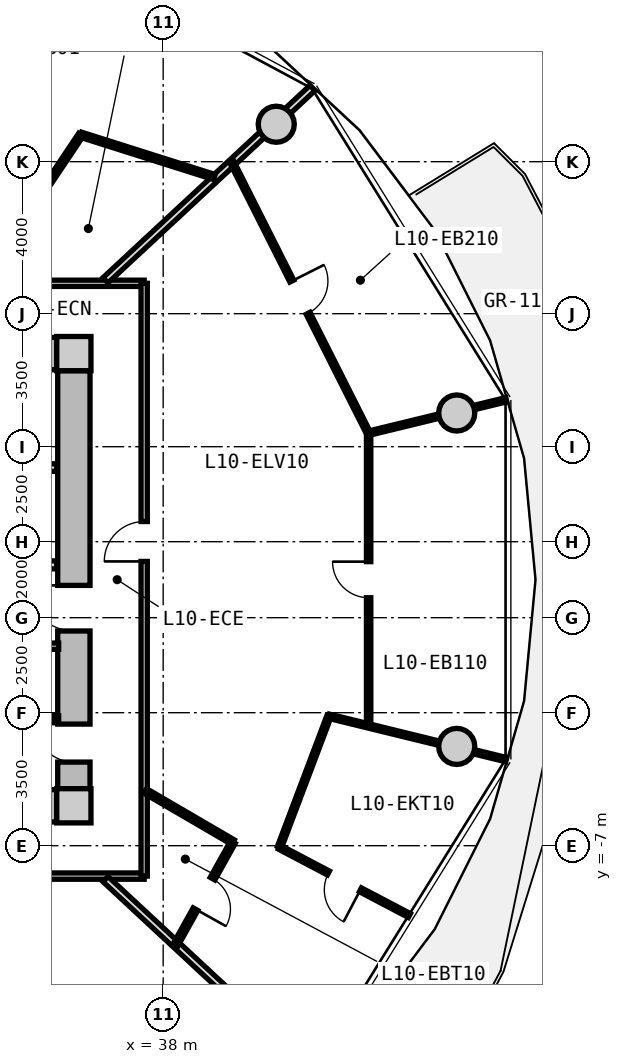
"""IFC4 building model, lengths in metres.
Left out: names, types, materials, properties, quantities, classifications, styles, units other than length and angle.
Written with IfcOpenShell. Run it as: python <this file> out.ifc"""

import sys

from ifc_helpers import new_model, si_unit, direction, frame, frame_2d, origin, origin_2d, place, context, subcontext, project, spatial, rectangle, circle, extrude, source, transform, mapped, element, fill, save


model = new_model("IFC4")
c1 = context("Model", 3, precision=1e-05, world=origin(), true_north=direction((0.0, 1.0)))
c2 = subcontext(c1, "Body", "Model", "MODEL_VIEW")
j1 = project(units=[si_unit("LENGTHUNIT", "METRE"), si_unit("PLANEANGLEUNIT", "RADIAN")], contexts=[c1])
p1 = place(None, origin())
s1 = spatial("IfcSite", under=j1, at=p1, CompositionType="ELEMENT")
p2 = place(p1, origin())
s2 = spatial("IfcBuilding", under=s1, at=p2, CompositionType="ELEMENT")
p3 = place(p2, frame((0.0, 0.0, 36.85)))
s3 = spatial("IfcBuildingStorey", under=s2, at=p3, CompositionType="ELEMENT", Elevation=36.85)
m1 = source(origin(), c2, "Body", "SweptSolid", [
    extrude(rectangle(XDim=0.9, YDim=0.9, at=origin_2d()), origin(), (0.0, 0.0, 1.0), 3.05),
])
for number, where, z_axis, x_axis in (
    (1, (35.65, -5.95, 0.0), (0.0, 0.0, 1.0), (1.0, 0.0, 0.0)),
    (2, (35.65, 5.95, 0.0), (0.0, 0.0, 1.0), (1.0, 0.0, 0.0)),
):
    element("IfcColumn", number, at=place(p3, frame(where, z_axis=z_axis, x_axis=x_axis)), inside=s3, PredefinedType="COLUMN", context=c2, shape_type="MappedRepresentation", body=[
        mapped(m1, transform((0.0, 0.0, 0.0), x_axis=(1.0, 0.0, 0.0), y_axis=(0.0, 1.0, 0.0), z_axis=(0.0, 0.0, 1.0), scale=1.0)),
    ])
m2 = source(origin(), c2, "Body", "SweptSolid", [
    extrude(rectangle(XDim=14.4, YDim=0.85, at=frame_2d((7.2, 0.0))), origin(), (0.0, 0.0, 1.0), 2.79),
])
for number, where, z_axis, x_axis in (
    (3, (20.8, 5.95, 0.0), (0.0, 0.0, 1.0), (1.0, 0.0, 0.0)),
    (4, (35.2, -5.95, 0.0), (0.0, 0.0, 1.0), (-1.0, 0.0, 0.0)),
):
    element("IfcWall", number, at=place(p3, frame(where, z_axis=z_axis, x_axis=x_axis)), inside=s3, PredefinedType="SHEAR", context=c2, shape_type="MappedRepresentation", body=[
        mapped(m2, transform((0.0, 0.0, 0.0), x_axis=(1.0, 0.0, 0.0), y_axis=(0.0, 1.0, 0.0), z_axis=(0.0, 0.0, 1.0), scale=1.0)),
    ])
m3 = source(origin(), c2, "Body", "SweptSolid", [
    extrude(rectangle(XDim=11.0, YDim=0.85, at=frame_2d((5.5, 0.0))), origin(), (0.0, 0.0, 1.0), 2.79),
])
p4 = place(p3, frame((35.65, 5.5, 0.0), z_axis=(0.0, 0.0, 1.0), x_axis=(0.0, -1.0, 0.0)))
e5 = element("IfcWall", 5, at=p4, inside=s3, PredefinedType="SHEAR", context=c2, shape_type="MappedRepresentation", body=[
    mapped(m3, transform((0.0, 0.0, 0.0), x_axis=(1.0, 0.0, 0.0), y_axis=(0.0, 1.0, 0.0), z_axis=(0.0, 0.0, 1.0), scale=1.0)),
])
p5 = place(p4, frame((5.65, 0.0, 0.0)))
e6 = element("IfcOpeningElement", 6, at=p5, cuts=e5, PredefinedType="OPENING", context=c2, shape_type="SweptSolid", body=[
    extrude(rectangle(XDim=1.2, YDim=2.15, at=frame_2d((0.6, 1.075))), frame((0.0, 0.435, 0.0), z_axis=(0.0, -1.0, 0.0), x_axis=(1.0, 0.0, 0.0)), (0.0, 0.0, 1.0), 0.87),
])
p6 = place(p4, frame((9.3, 0.0, 0.0)))
e7 = element("IfcOpeningElement", 7, at=p6, cuts=e5, PredefinedType="OPENING", context=c2, shape_type="SweptSolid", body=[
    extrude(rectangle(XDim=1.0, YDim=2.1, at=frame_2d((0.5, 1.05))), frame((0.0, 0.435, 0.0), z_axis=(0.0, -1.0, 0.0), x_axis=(1.0, 0.0, 0.0)), (0.0, 0.0, 1.0), 0.87),
])
m4 = source(origin(), c2, "Body", "SweptSolid", [
    extrude(circle(Radius=0.475, at=origin_2d()), origin(), (0.0, 0.0, 1.0), 3.05),
])
for number, where, z_axis, x_axis in (
    (8, (45.725, 4.387, 0.0), (0.0, 0.0, 1.0), (1.0, 0.0, 0.0)),
    (9, (40.975, 11.985, 0.0), (0.0, 0.0, 1.0), (1.0, 0.0, 0.0)),
    (10, (45.725, -4.387, 0.0), (0.0, 0.0, 1.0), (1.0, 0.0, 0.0)),
):
    element("IfcColumn", number, at=place(p3, frame(where, z_axis=z_axis, x_axis=x_axis)), inside=s3, PredefinedType="COLUMN", context=c2, shape_type="MappedRepresentation", body=[
        mapped(m4, transform((0.0, 0.0, 0.0), x_axis=(1.0, 0.0, 0.0), y_axis=(0.0, 1.0, 0.0), z_axis=(0.0, 0.0, 1.0), scale=1.0)),
    ])
m5 = source(origin(), c2, "Body", "SweptSolid", [
    extrude(rectangle(XDim=3.2, YDim=0.2, at=frame_2d((1.6, 0.0))), origin(), (0.0, 0.0, 1.0), 2.775),
])
p7 = place(p3, frame((32.0, 2.95, 0.0), z_axis=(0.0, 0.0, 1.0), x_axis=(1.0, 0.0, 0.0)))
e11 = element("IfcWall", 11, at=p7, inside=s3, PredefinedType="PARTITIONING", context=c2, shape_type="MappedRepresentation", body=[
    mapped(m5, transform((0.0, 0.0, 0.0), x_axis=(1.0, 0.0, 0.0), y_axis=(0.0, 1.0, 0.0), z_axis=(0.0, 0.0, 1.0), scale=1.0)),
])
m6 = source(origin(), c2, "Body", "SweptSolid", [
    extrude(rectangle(XDim=6.66, YDim=0.21, at=frame_2d((3.33, 0.0))), origin(), (0.0, 0.0, 1.0), 2.775),
])
p8 = place(p3, frame((28.54, 0.39, 0.0), z_axis=(0.0, 0.0, 1.0), x_axis=(1.0, 0.0, 0.0)))
e12 = element("IfcWall", 12, at=p8, inside=s3, PredefinedType="PARTITIONING", context=c2, shape_type="MappedRepresentation", body=[
    mapped(m6, transform((0.0, 0.0, 0.0), x_axis=(1.0, 0.0, 0.0), y_axis=(0.0, 1.0, 0.0), z_axis=(0.0, 0.0, 1.0), scale=1.0)),
])
p9 = place(p8, frame((1.0, 0.0, 0.0)))
e13 = element("IfcOpeningElement", 13, at=p9, cuts=e12, PredefinedType="OPENING", context=c2, shape_type="SweptSolid", body=[
    extrude(rectangle(XDim=1.2, YDim=2.15, at=frame_2d((0.6, 1.075))), frame((0.0, 0.115, 0.0), z_axis=(0.0, -1.0, 0.0), x_axis=(1.0, 0.0, 0.0)), (0.0, 0.0, 1.0), 0.23),
])
m7 = source(origin(), c2, "Body", "SweptSolid", [
    extrude(rectangle(XDim=2.7, YDim=0.165, at=frame_2d((1.35, 0.0))), origin(), (0.0, 0.0, 1.0), 2.775),
])
p10 = place(p3, frame((32.55, -1.75, 0.0), z_axis=(0.0, 0.0, 1.0), x_axis=(1.0, 0.0, 0.0)))
e14 = element("IfcWall", 14, at=p10, inside=s3, PredefinedType="PARTITIONING", context=c2, shape_type="MappedRepresentation", body=[
    mapped(m7, transform((0.0, 0.0, 0.0), x_axis=(1.0, 0.0, 0.0), y_axis=(0.0, 1.0, 0.0), z_axis=(0.0, 0.0, 1.0), scale=1.0)),
])
p11 = place(p10, frame((0.85, 0.0, 0.0)))
e15 = element("IfcOpeningElement", 15, at=p11, cuts=e14, PredefinedType="OPENING", context=c2, shape_type="SweptSolid", body=[
    extrude(rectangle(XDim=0.925, YDim=2.1, at=frame_2d((0.462, 1.05))), frame((0.0, 0.093, 0.0), z_axis=(0.0, -1.0, 0.0), x_axis=(1.0, 0.0, 0.0)), (0.0, 0.0, 1.0), 0.185),
])
m8 = source(origin(), c2, "Body", "SweptSolid", [
    extrude(rectangle(XDim=2.7, YDim=0.14, at=frame_2d((1.35, 0.0))), origin(), (0.0, 0.0, 1.0), 2.775),
])
p12 = place(p3, frame((32.55, -3.65, 0.0), z_axis=(0.0, 0.0, 1.0), x_axis=(1.0, 0.0, 0.0)))
e16 = element("IfcWall", 16, at=p12, inside=s3, PredefinedType="PARTITIONING", context=c2, shape_type="MappedRepresentation", body=[
    mapped(m8, transform((0.0, 0.0, 0.0), x_axis=(1.0, 0.0, 0.0), y_axis=(0.0, 1.0, 0.0), z_axis=(0.0, 0.0, 1.0), scale=1.0)),
])
m9 = source(origin(), c2, "Body", "SweptSolid", [
    extrude(rectangle(XDim=19.0, YDim=0.165, at=frame_2d((9.5, 0.0))), origin(), (0.0, 0.0, 1.0), 2.775),
])
p13 = place(p3, frame((18.5, 7.8, 0.0), z_axis=(0.0, 0.0, 1.0), x_axis=(1.0, 0.0, 0.0)))
e17 = element("IfcWall", 17, at=p13, inside=s3, PredefinedType="PARTITIONING", context=c2, shape_type="MappedRepresentation", body=[
    mapped(m9, transform((0.0, 0.0, 0.0), x_axis=(1.0, 0.0, 0.0), y_axis=(0.0, 1.0, 0.0), z_axis=(0.0, 0.0, 1.0), scale=1.0)),
])
p14 = place(p13, frame((10.523, 0.0, 0.0)))
e18 = element("IfcOpeningElement", 18, at=p14, cuts=e17, PredefinedType="OPENING", context=c2, shape_type="SweptSolid", body=[
    extrude(rectangle(XDim=0.92, YDim=2.1, at=frame_2d((0.46, 1.05))), frame((0.0, 0.093, 0.0), z_axis=(0.0, -1.0, 0.0), x_axis=(1.0, 0.0, 0.0)), (0.0, 0.0, 1.0), 0.185),
])
p15 = place(p13, frame((8.226, 0.0, 0.0)))
e19 = element("IfcOpeningElement", 19, at=p15, cuts=e17, PredefinedType="OPENING", context=c2, shape_type="SweptSolid", body=[
    extrude(rectangle(XDim=0.92, YDim=2.1, at=frame_2d((0.46, 1.05))), frame((0.0, 0.093, 0.0), z_axis=(0.0, -1.0, 0.0), x_axis=(1.0, 0.0, 0.0)), (0.0, 0.0, 1.0), 0.185),
])
p16 = place(p13, frame((3.506, 0.0, 0.0)))
e20 = element("IfcOpeningElement", 20, at=p16, cuts=e17, PredefinedType="OPENING", context=c2, shape_type="SweptSolid", body=[
    extrude(rectangle(XDim=1.25, YDim=2.2, at=frame_2d((0.625, 1.1))), frame((0.0, 0.093, 0.0), z_axis=(0.0, -1.0, 0.0), x_axis=(1.0, 0.0, 0.0)), (0.0, 0.0, 1.0), 0.185),
])
p17 = place(p13, frame((12.706, 0.0, 0.0)))
e21 = element("IfcOpeningElement", 21, at=p17, cuts=e17, PredefinedType="OPENING", context=c2, shape_type="SweptSolid", body=[
    extrude(rectangle(XDim=1.05, YDim=2.15, at=frame_2d((0.525, 1.075))), frame((0.0, 0.093, 0.0), z_axis=(0.0, -1.0, 0.0), x_axis=(1.0, 0.0, 0.0)), (0.0, 0.0, 1.0), 0.185),
])
p18 = place(p3, frame((37.5, -7.8, 0.0), z_axis=(0.0, 0.0, 1.0), x_axis=(-1.0, 0.0, 0.0)))
e22 = element("IfcWall", 22, at=p18, inside=s3, PredefinedType="PARTITIONING", context=c2, shape_type="MappedRepresentation", body=[
    mapped(m9, transform((0.0, 0.0, 0.0), x_axis=(1.0, 0.0, 0.0), y_axis=(0.0, 1.0, 0.0), z_axis=(0.0, 0.0, 1.0), scale=1.0)),
])
p19 = place(p18, frame((7.336, 0.0, 0.0)))
e23 = element("IfcOpeningElement", 23, at=p19, cuts=e22, PredefinedType="OPENING", context=c2, shape_type="SweptSolid", body=[
    extrude(rectangle(XDim=1.05, YDim=2.15, at=frame_2d((0.525, 1.075))), frame((0.0, 0.093, 0.0), z_axis=(0.0, -1.0, 0.0), x_axis=(1.0, 0.0, 0.0)), (0.0, 0.0, 1.0), 0.185),
])
m10 = source(origin(), c2, "Body", "SweptSolid", [
    extrude(rectangle(XDim=15.6, YDim=0.165, at=frame_2d((7.8, 0.0))), origin(), (0.0, 0.0, 1.0), 2.775),
])
p20 = place(p3, frame((37.5, 7.8, 0.0), z_axis=(0.0, 0.0, 1.0), x_axis=(0.0, -1.0, 0.0)))
e24 = element("IfcWall", 24, at=p20, inside=s3, PredefinedType="PARTITIONING", context=c2, shape_type="MappedRepresentation", body=[
    mapped(m10, transform((0.0, 0.0, 0.0), x_axis=(1.0, 0.0, 0.0), y_axis=(0.0, 1.0, 0.0), z_axis=(0.0, 0.0, 1.0), scale=1.0)),
])
p21 = place(p20, frame((6.269, 0.0, 0.0)))
e25 = element("IfcOpeningElement", 25, at=p21, cuts=e24, PredefinedType="OPENING", context=c2, shape_type="SweptSolid", body=[
    extrude(rectangle(XDim=1.05, YDim=2.15, at=frame_2d((0.525, 1.075))), frame((0.0, 0.093, 0.0), z_axis=(0.0, -1.0, 0.0), x_axis=(1.0, 0.0, 0.0)), (0.0, 0.0, 1.0), 0.185),
])
m11 = source(origin(), c2, "Body", "SweptSolid", [
    extrude(rectangle(XDim=7.435, YDim=0.19, at=frame_2d((3.717, 0.0))), origin(), (0.0, 0.0, 1.0), 2.225),
])
for number, where, z_axis, x_axis in (
    (26, (36.483, -7.88, 0.0), (0.0, 0.0, 1.0), (0.733, -0.681, 0.0)),
    (27, (36.483, 7.88, 0.0), (0.0, 0.0, 1.0), (0.733, 0.681, 0.0)),
):
    element("IfcWall", number, at=place(p3, frame(where, z_axis=z_axis, x_axis=x_axis)), inside=s3, PredefinedType="PARTITIONING", context=c2, shape_type="MappedRepresentation", body=[
        mapped(m11, transform((0.0, 0.0, 0.0), x_axis=(1.0, 0.0, 0.0), y_axis=(0.0, 1.0, 0.0), z_axis=(0.0, 0.0, 1.0), scale=1.0)),
    ])
m12 = source(origin(), c2, "Body", "SweptSolid", [
    extrude(rectangle(XDim=7.709, YDim=0.115, at=frame_2d((3.855, 0.0))), origin(), (0.0, 0.0, 1.0), 2.775),
])
p22 = place(p3, frame((43.406, -3.855, 0.0), z_axis=(0.0, 0.0, 1.0), x_axis=(0.0, 1.0, 0.0)))
e28 = element("IfcWall", 28, at=p22, inside=s3, PredefinedType="PARTITIONING", context=c2, shape_type="MappedRepresentation", body=[
    mapped(m12, transform((0.0, 0.0, 0.0), x_axis=(1.0, 0.0, 0.0), y_axis=(0.0, 1.0, 0.0), z_axis=(0.0, 0.0, 1.0), scale=1.0)),
])
p23 = place(p22, frame((3.38, 0.0, 0.0)))
e29 = element("IfcOpeningElement", 29, at=p23, cuts=e28, PredefinedType="OPENING", context=c2, shape_type="SweptSolid", body=[
    extrude(rectangle(XDim=0.95, YDim=2.1, at=frame_2d((0.475, 1.05))), frame((0.0, 0.067, 0.0), z_axis=(0.0, -1.0, 0.0), x_axis=(1.0, 0.0, 0.0)), (0.0, 0.0, 1.0), 0.135),
])
m13 = source(origin(), c2, "Body", "SweptSolid", [
    extrude(rectangle(XDim=4.803, YDim=0.115, at=frame_2d((2.401, 0.0))), origin(), (0.0, 0.0, 1.0), 2.225),
])
p24 = place(p3, frame((42.364, -3.594, 0.0), z_axis=(0.0, 0.0, 1.0), x_axis=(0.97129155908, -0.237892217736, 0.0)))
e30 = element("IfcWall", 30, at=p24, inside=s3, PredefinedType="PARTITIONING", context=c2, shape_type="MappedRepresentation", body=[
    mapped(m13, transform((0.0, 0.0, 0.0), x_axis=(1.0, 0.0, 0.0), y_axis=(0.0, 1.0, 0.0), z_axis=(0.0, 0.0, 1.0), scale=1.0)),
])
m14 = source(origin(), c2, "Body", "SweptSolid", [
    extrude(rectangle(XDim=8.018, YDim=0.115, at=frame_2d((4.009, 0.0))), origin(), (0.0, 0.0, 1.0), 2.775),
])
p25 = place(p3, frame((43.404, 3.854, 0.0), z_axis=(0.0, 0.0, 1.0), x_axis=(-0.450134355233, 0.89296084026, 0.0)))
e31 = element("IfcWall", 31, at=p25, inside=s3, PredefinedType="PARTITIONING", context=c2, shape_type="MappedRepresentation", body=[
    mapped(m14, transform((0.0, 0.0, 0.0), x_axis=(1.0, 0.0, 0.0), y_axis=(0.0, 1.0, 0.0), z_axis=(0.0, 0.0, 1.0), scale=1.0)),
])
p26 = place(p25, frame((3.534, 0.0, 0.0)))
e32 = element("IfcOpeningElement", 32, at=p26, cuts=e31, PredefinedType="OPENING", context=c2, shape_type="SweptSolid", body=[
    extrude(rectangle(XDim=0.95, YDim=2.1, at=frame_2d((0.475, 1.05))), frame((0.0, 0.067, 0.0), z_axis=(0.0, -1.0, 0.0), x_axis=(1.0, 0.0, 0.0)), (0.0, 0.0, 1.0), 0.135),
])
m15 = source(origin(), c2, "Body", "SweptSolid", [
    extrude(rectangle(XDim=3.73, YDim=0.115, at=frame_2d((1.865, 0.0))), origin(), (0.0, 0.0, 1.0), 2.225),
])
p27 = place(p3, frame((43.404, 3.854, 0.0), z_axis=(0.0, 0.0, 1.0), x_axis=(0.971644038568, 0.236448434791, 0.0)))
e33 = element("IfcWall", 33, at=p27, inside=s3, PredefinedType="PARTITIONING", context=c2, shape_type="MappedRepresentation", body=[
    mapped(m15, transform((0.0, 0.0, 0.0), x_axis=(1.0, 0.0, 0.0), y_axis=(0.0, 1.0, 0.0), z_axis=(0.0, 0.0, 1.0), scale=1.0)),
])
m16 = source(origin(), c2, "Body", "SweptSolid", [
    extrude(rectangle(XDim=2.669, YDim=0.14, at=frame_2d((1.335, 0.0))), origin(), (0.0, 0.0, 1.0), 2.775),
])
p28 = place(p3, frame((37.53, -5.561, 0.0), z_axis=(0.0, 0.0, 1.0), x_axis=(0.86369928178, -0.50400749067, 0.0)))
e34 = element("IfcWall", 34, at=p28, inside=s3, PredefinedType="PARTITIONING", context=c2, shape_type="MappedRepresentation", body=[
    mapped(m16, transform((0.0, 0.0, 0.0), x_axis=(1.0, 0.0, 0.0), y_axis=(0.0, 1.0, 0.0), z_axis=(0.0, 0.0, 1.0), scale=1.0)),
])
m17 = source(origin(), c2, "Body", "SweptSolid", [
    extrude(rectangle(XDim=3.121, YDim=0.14, at=frame_2d((1.561, 0.0))), origin(), (0.0, 0.0, 1.0), 2.775),
])
p29 = place(p3, frame((39.836, -6.906, 0.0), z_axis=(0.0, 0.0, 1.0), x_axis=(-0.487302357327, -0.873233309342, 0.0)))
e35 = element("IfcWall", 35, at=p29, inside=s3, PredefinedType="PARTITIONING", context=c2, shape_type="MappedRepresentation", body=[
    mapped(m17, transform((0.0, 0.0, 0.0), x_axis=(1.0, 0.0, 0.0), y_axis=(0.0, 1.0, 0.0), z_axis=(0.0, 0.0, 1.0), scale=1.0)),
])
p30 = place(p29, frame((1.101, 0.0, 0.0)))
e36 = element("IfcOpeningElement", 36, at=p30, cuts=e35, PredefinedType="OPENING", context=c2, shape_type="SweptSolid", body=[
    extrude(rectangle(XDim=0.92, YDim=2.1, at=frame_2d((0.46, 1.05))), frame((0.0, 0.08, 0.0), z_axis=(0.0, -1.0, 0.0), x_axis=(1.0, 0.0, 0.0)), (0.0, 0.0, 1.0), 0.16),
])
m18 = source(origin(), c2, "Body", "SweptSolid", [
    extrude(rectangle(XDim=3.864, YDim=0.115, at=frame_2d((1.932, 0.0))), origin(), (0.0, 0.0, 1.0), 2.775),
])
p31 = place(p3, frame((41.06, -7.041, 0.0), z_axis=(0.0, 0.0, 1.0), x_axis=(0.885194959803, -0.465220252289, 0.0)))
e37 = element("IfcWall", 37, at=p31, inside=s3, PredefinedType="PARTITIONING", context=c2, shape_type="MappedRepresentation", body=[
    mapped(m18, transform((0.0, 0.0, 0.0), x_axis=(1.0, 0.0, 0.0), y_axis=(0.0, 1.0, 0.0), z_axis=(0.0, 0.0, 1.0), scale=1.0)),
])
p32 = place(p31, frame((1.457, 0.0, 0.0)))
e38 = element("IfcOpeningElement", 38, at=p32, cuts=e37, PredefinedType="OPENING", context=c2, shape_type="SweptSolid", body=[
    extrude(rectangle(XDim=0.95, YDim=2.1, at=frame_2d((0.475, 1.05))), frame((0.0, 0.067, 0.0), z_axis=(0.0, -1.0, 0.0), x_axis=(1.0, 0.0, 0.0)), (0.0, 0.0, 1.0), 0.135),
])
m19 = source(origin(), c2, "Body", "SweptSolid", [
    extrude(rectangle(XDim=3.685, YDim=0.115, at=frame_2d((1.843, 0.0))), origin(), (0.0, 0.0, 1.0), 2.775),
])
p33 = place(p3, frame((41.06, -7.041, 0.0), z_axis=(0.0, 0.0, 1.0), x_axis=(0.353503632997, 0.935433151785, 0.0)))
e39 = element("IfcWall", 39, at=p33, inside=s3, PredefinedType="PARTITIONING", context=c2, shape_type="MappedRepresentation", body=[
    mapped(m19, transform((0.0, 0.0, 0.0), x_axis=(1.0, 0.0, 0.0), y_axis=(0.0, 1.0, 0.0), z_axis=(0.0, 0.0, 1.0), scale=1.0)),
])
m20 = source(origin(), c2, "Body", "SweptSolid", [
    extrude(rectangle(XDim=4.668, YDim=0.14, at=frame_2d((2.334, 0.0))), origin(), (0.0, 0.0, 1.0), 2.775),
])
p34 = place(p3, frame((33.24, 7.83, 0.0), z_axis=(0.0, 0.0, 1.0), x_axis=(0.55615986029, 0.83107533341, 0.0)))
e40 = element("IfcWall", 40, at=p34, inside=s3, PredefinedType="PARTITIONING", context=c2, shape_type="MappedRepresentation", body=[
    mapped(m20, transform((0.0, 0.0, 0.0), x_axis=(1.0, 0.0, 0.0), y_axis=(0.0, 1.0, 0.0), z_axis=(0.0, 0.0, 1.0), scale=1.0)),
])
p35 = place(p34, frame((1.874, 0.0, 0.0)))
e41 = element("IfcOpeningElement", 41, at=p35, cuts=e40, PredefinedType="OPENING", context=c2, shape_type="SweptSolid", body=[
    extrude(rectangle(XDim=0.92, YDim=2.1, at=frame_2d((0.46, 1.05))), frame((0.0, 0.08, 0.0), z_axis=(0.0, -1.0, 0.0), x_axis=(1.0, 0.0, 0.0)), (0.0, 0.0, 1.0), 0.16),
])
m21 = source(origin(), c2, "Body", "SweptSolid", [
    extrude(rectangle(XDim=3.684, YDim=0.14, at=frame_2d((1.842, 0.0))), origin(), (0.0, 0.0, 1.0), 2.775),
])
p36 = place(p3, frame((35.836, 11.709, 0.0), z_axis=(0.0, 0.0, 1.0), x_axis=(0.953245538614, -0.302196861518, 0.0)))
e42 = element("IfcWall", 42, at=p36, inside=s3, PredefinedType="PARTITIONING", context=c2, shape_type="MappedRepresentation", body=[
    mapped(m21, transform((0.0, 0.0, 0.0), x_axis=(1.0, 0.0, 0.0), y_axis=(0.0, 1.0, 0.0), z_axis=(0.0, 0.0, 1.0), scale=1.0)),
])
m22 = source(origin(), c2, "Body", "SweptSolid", [
    extrude(rectangle(XDim=1.2, YDim=2.15, at=frame_2d((0.6, 1.075))), frame((0.0, 0.025, 0.0), z_axis=(0.0, -1.0, 0.0), x_axis=(1.0, 0.0, 0.0)), (0.0, 0.0, 1.0), 0.05),
])
p37 = place(p5, frame((1.2, 0.0, 0.0), z_axis=(0.0, 0.0, 1.0), x_axis=(-1.0, 0.0, 0.0)))
e43 = element("IfcDoor", 43, at=p37, inside=s3, OperationType="SINGLE_SWING_RIGHT", PredefinedType="DOOR", context=c2, shape_type="MappedRepresentation", body=[
    mapped(m22, transform((0.0, 0.0, 0.0), x_axis=(1.0, 0.0, 0.0), y_axis=(0.0, 1.0, 0.0), z_axis=(0.0, 0.0, 1.0), scale=1.0)),
])
fill(e6, e43)
m23 = source(origin(), c2, "Body", "SweptSolid", [
    extrude(rectangle(XDim=1.0, YDim=2.1, at=frame_2d((0.5, 1.05))), frame((0.0, 0.025, 0.0), z_axis=(0.0, -1.0, 0.0), x_axis=(1.0, 0.0, 0.0)), (0.0, 0.0, 1.0), 0.05),
])
p38 = place(p6, frame((1.0, 0.0, 0.0), z_axis=(0.0, 0.0, 1.0), x_axis=(-1.0, 0.0, 0.0)))
e44 = element("IfcDoor", 44, at=p38, inside=s3, OperationType="SINGLE_SWING_RIGHT", PredefinedType="DOOR", context=c2, shape_type="MappedRepresentation", body=[
    mapped(m23, transform((0.0, 0.0, 0.0), x_axis=(1.0, 0.0, 0.0), y_axis=(0.0, 1.0, 0.0), z_axis=(0.0, 0.0, 1.0), scale=1.0)),
])
fill(e7, e44)
m24 = source(origin(), c2, "Body", "SweptSolid", [
    extrude(rectangle(XDim=1.05, YDim=2.15, at=frame_2d((0.525, 1.075))), frame((0.0, 0.025, 0.0), z_axis=(0.0, -1.0, 0.0), x_axis=(1.0, 0.0, 0.0)), (0.0, 0.0, 1.0), 0.05),
])
p39 = place(p21, frame((1.05, 0.0, 0.0), z_axis=(0.0, 0.0, 1.0), x_axis=(-1.0, 0.0, 0.0)))
e45 = element("IfcDoor", 45, at=p39, inside=s3, OperationType="SINGLE_SWING_LEFT", PredefinedType="DOOR", context=c2, shape_type="MappedRepresentation", body=[
    mapped(m24, transform((0.0, 0.0, 0.0), x_axis=(1.0, 0.0, 0.0), y_axis=(0.0, 1.0, 0.0), z_axis=(0.0, 0.0, 1.0), scale=1.0)),
])
fill(e25, e45)
m25 = source(origin(), c2, "Body", "SweptSolid", [
    extrude(rectangle(XDim=0.92, YDim=2.1, at=frame_2d((0.46, 1.05))), frame((0.0, 0.025, 0.0), z_axis=(0.0, -1.0, 0.0), x_axis=(1.0, 0.0, 0.0)), (0.0, 0.0, 1.0), 0.05),
])
p40 = place(p30, origin())
e46 = element("IfcDoor", 46, at=p40, inside=s3, OperationType="SINGLE_SWING_RIGHT", PredefinedType="DOOR", context=c2, shape_type="MappedRepresentation", body=[
    mapped(m25, transform((0.0, 0.0, 0.0), x_axis=(1.0, 0.0, 0.0), y_axis=(0.0, 1.0, 0.0), z_axis=(0.0, 0.0, 1.0), scale=1.0)),
])
fill(e36, e46)
m26 = source(origin(), c2, "Body", "SweptSolid", [
    extrude(rectangle(XDim=0.95, YDim=2.1, at=frame_2d((0.475, 1.05))), frame((0.0, 0.025, 0.0), z_axis=(0.0, -1.0, 0.0), x_axis=(1.0, 0.0, 0.0)), (0.0, 0.0, 1.0), 0.05),
])
p41 = place(p32, frame((0.95, 0.0, 0.0), z_axis=(0.0, 0.0, 1.0), x_axis=(-1.0, 0.0, 0.0)))
e47 = element("IfcDoor", 47, at=p41, inside=s3, OperationType="SINGLE_SWING_LEFT", PredefinedType="DOOR", context=c2, shape_type="MappedRepresentation", body=[
    mapped(m26, transform((0.0, 0.0, 0.0), x_axis=(1.0, 0.0, 0.0), y_axis=(0.0, 1.0, 0.0), z_axis=(0.0, 0.0, 1.0), scale=1.0)),
])
fill(e38, e47)
p42 = place(p23, origin())
e48 = element("IfcDoor", 48, at=p42, inside=s3, OperationType="SINGLE_SWING_RIGHT", PredefinedType="DOOR", context=c2, shape_type="MappedRepresentation", body=[
    mapped(m26, transform((0.0, 0.0, 0.0), x_axis=(1.0, 0.0, 0.0), y_axis=(0.0, 1.0, 0.0), z_axis=(0.0, 0.0, 1.0), scale=1.0)),
])
fill(e29, e48)
p43 = place(p26, frame((0.95, 0.0, 0.0), z_axis=(0.0, 0.0, 1.0), x_axis=(-1.0, 0.0, 0.0)))
e49 = element("IfcDoor", 49, at=p43, inside=s3, OperationType="SINGLE_SWING_LEFT", PredefinedType="DOOR", context=c2, shape_type="MappedRepresentation", body=[
    mapped(m26, transform((0.0, 0.0, 0.0), x_axis=(1.0, 0.0, 0.0), y_axis=(0.0, 1.0, 0.0), z_axis=(0.0, 0.0, 1.0), scale=1.0)),
])
fill(e32, e49)
save(model, sys.argv[1])
